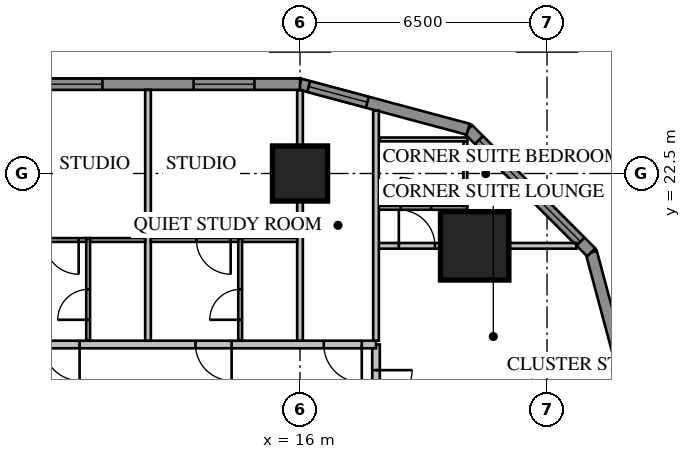
"""IFC4 building model, lengths in metres.
Left out: names, types, materials, properties, quantities, classifications, styles, units other than length and angle.
Written with IfcOpenShell. Run it as: python <this file> out.ifc"""

import sys

from ifc_helpers import new_model, si_unit, direction, frame, frame_2d, origin, origin_2d, place, context, subcontext, project, spatial, rectangle, extrude, element, fill, save


model = new_model("IFC4")
c1 = context("Model", 3, precision=1e-05, world=origin(), true_north=direction((0.0, 1.0)))
c2 = subcontext(c1, "Body", "Model", "MODEL_VIEW")
j1 = project(units=[si_unit("LENGTHUNIT", "METRE"), si_unit("PLANEANGLEUNIT", "RADIAN")], contexts=[c1])
p1 = place(None, origin())
s1 = spatial("IfcSite", under=j1, at=p1, CompositionType="ELEMENT")
p2 = place(p1, origin())
s2 = spatial("IfcBuilding", under=s1, at=p2, CompositionType="ELEMENT")
p3 = place(p2, frame((0.0, 0.0, 27.55)))
s3 = spatial("IfcBuildingStorey", under=s2, at=p3, CompositionType="ELEMENT", Elevation=27.55)
p4 = place(p3, frame((20.596, 20.596, 0.0), z_axis=(0.0, 0.0, 1.0), x_axis=(1.0, 0.0, 0.0)))
e1 = element("IfcColumn", 1, at=p4, inside=s3, PredefinedType="COLUMN", context=c2, shape_type="SweptSolid", body=[
    extrude(rectangle(XDim=1.8, YDim=1.8, at=origin_2d()), origin(), (0.0, 0.0, 1.0), 3.85),
])
p5 = place(p3, frame((16.0, 22.5, 0.0), z_axis=(0.0, 0.0, 1.0), x_axis=(1.0, 0.0, 0.0)))
e2 = element("IfcColumn", 2, at=p5, inside=s3, PredefinedType="COLUMN", context=c2, shape_type="SweptSolid", body=[
    extrude(rectangle(XDim=1.45, YDim=1.45, at=origin_2d()), origin(), (0.0, 0.0, 1.0), 3.85),
])
p6 = place(p3, frame((24.85, 16.0, 0.0), z_axis=(0.0, 0.0, 1.0), x_axis=(-0.258839972501, 0.965920218567, 0.0)))
e3 = element("IfcWall", 3, at=p6, inside=s3, PredefinedType="SOLIDWALL", context=c2, shape_type="SweptSolid", body=[
    extrude(rectangle(XDim=4.581, YDim=0.3, at=frame_2d((2.291, 0.0))), origin(), (0.0, 0.0, 1.0), 3.65),
])
p7 = place(p3, frame((23.664, 20.425, 0.0), z_axis=(0.0, 0.0, 1.0), x_axis=(-0.707106781187, 0.707106781187, 0.0)))
e4 = element("IfcWall", 4, at=p7, inside=s3, PredefinedType="SOLIDWALL", context=c2, shape_type="SweptSolid", body=[
    extrude(rectangle(XDim=4.581, YDim=0.3, at=frame_2d((2.291, 0.0))), origin(), (0.0, 0.0, 1.0), 3.65),
])
p8 = place(p7, frame((0.4, 0.0, 0.75)))
e5 = element("IfcOpeningElement", 5, at=p8, cuts=e4, PredefinedType="OPENING", context=c2, shape_type="SweptSolid", body=[
    extrude(rectangle(XDim=3.781, YDim=1.8, at=frame_2d((1.891, 0.9))), frame((0.0, 0.17, 0.0), z_axis=(0.0, -1.0, 0.0), x_axis=(1.0, 0.0, 0.0)), (0.0, 0.0, 1.0), 0.34),
])
p9 = place(p3, frame((20.425, 23.664, 0.0), z_axis=(0.0, 0.0, 1.0), x_axis=(-0.965920218567, 0.258839972501, 0.0)))
e6 = element("IfcWall", 6, at=p9, inside=s3, PredefinedType="SOLIDWALL", context=c2, shape_type="SweptSolid", body=[
    extrude(rectangle(XDim=4.581, YDim=0.3, at=frame_2d((2.291, 0.0))), origin(), (0.0, 0.0, 1.0), 3.65),
])
p10 = place(p9, frame((2.746, 0.0, 0.75)))
e7 = element("IfcOpeningElement", 7, at=p10, cuts=e6, PredefinedType="OPENING", context=c2, shape_type="SweptSolid", body=[
    extrude(rectangle(XDim=1.6, YDim=1.8, at=frame_2d((0.8, 0.9))), frame((0.0, 0.17, 0.0), z_axis=(0.0, -1.0, 0.0), x_axis=(1.0, 0.0, 0.0)), (0.0, 0.0, 1.0), 0.34),
])
p11 = place(p3, frame((16.0, 24.85, 0.0), z_axis=(0.0, 0.0, 1.0), x_axis=(-1.0, 0.0, 0.0)))
e8 = element("IfcWall", 8, at=p11, inside=s3, PredefinedType="SOLIDWALL", context=c2, shape_type="SweptSolid", body=[
    extrude(rectangle(XDim=32.0, YDim=0.3, at=frame_2d((16.0, 0.0))), origin(), (0.0, 0.0, 1.0), 3.65),
])
p12 = place(p11, frame((1.2, 0.0, 0.75)))
e9 = element("IfcOpeningElement", 9, at=p12, cuts=e8, PredefinedType="OPENING", context=c2, shape_type="SweptSolid", body=[
    extrude(rectangle(XDim=1.6, YDim=1.8, at=frame_2d((0.8, 0.9))), frame((0.0, 0.17, 0.0), z_axis=(0.0, -1.0, 0.0), x_axis=(1.0, 0.0, 0.0)), (0.0, 0.0, 1.0), 0.34),
])
p13 = place(p11, frame((5.2, 0.0, 0.75)))
e10 = element("IfcOpeningElement", 10, at=p13, cuts=e8, PredefinedType="OPENING", context=c2, shape_type="SweptSolid", body=[
    extrude(rectangle(XDim=1.6, YDim=1.8, at=frame_2d((0.8, 0.9))), frame((0.0, 0.17, 0.0), z_axis=(0.0, -1.0, 0.0), x_axis=(1.0, 0.0, 0.0)), (0.0, 0.0, 1.0), 0.34),
])
p14 = place(p11, frame((17.2, 0.0, 0.75)))
e11 = element("IfcOpeningElement", 11, at=p14, cuts=e8, PredefinedType="OPENING", context=c2, shape_type="SweptSolid", body=[
    extrude(rectangle(XDim=1.6, YDim=1.8, at=frame_2d((0.8, 0.9))), frame((0.0, 0.17, 0.0), z_axis=(0.0, -1.0, 0.0), x_axis=(1.0, 0.0, 0.0)), (0.0, 0.0, 1.0), 0.34),
])
p15 = place(p11, frame((21.2, 0.0, 0.75)))
e12 = element("IfcOpeningElement", 12, at=p15, cuts=e8, PredefinedType="OPENING", context=c2, shape_type="SweptSolid", body=[
    extrude(rectangle(XDim=1.6, YDim=1.8, at=frame_2d((0.8, 0.9))), frame((0.0, 0.17, 0.0), z_axis=(0.0, -1.0, 0.0), x_axis=(1.0, 0.0, 0.0)), (0.0, 0.0, 1.0), 0.34),
])
p16 = place(p11, frame((25.2, 0.0, 0.75)))
e13 = element("IfcOpeningElement", 13, at=p16, cuts=e8, PredefinedType="OPENING", context=c2, shape_type="SweptSolid", body=[
    extrude(rectangle(XDim=1.6, YDim=1.8, at=frame_2d((0.8, 0.9))), frame((0.0, 0.17, 0.0), z_axis=(0.0, -1.0, 0.0), x_axis=(1.0, 0.0, 0.0)), (0.0, 0.0, 1.0), 0.34),
])
p17 = place(p11, frame((29.2, 0.0, 0.75)))
e14 = element("IfcOpeningElement", 14, at=p17, cuts=e8, PredefinedType="OPENING", context=c2, shape_type="SweptSolid", body=[
    extrude(rectangle(XDim=1.6, YDim=1.8, at=frame_2d((0.8, 0.9))), frame((0.0, 0.17, 0.0), z_axis=(0.0, -1.0, 0.0), x_axis=(1.0, 0.0, 0.0)), (0.0, 0.0, 1.0), 0.34),
])
p18 = place(p11, frame((8.8, 0.0, 0.75)))
e15 = element("IfcOpeningElement", 15, at=p18, cuts=e8, PredefinedType="OPENING", context=c2, shape_type="SweptSolid", body=[
    extrude(rectangle(XDim=2.4, YDim=1.8, at=frame_2d((1.2, 0.9))), frame((0.0, 0.17, 0.0), z_axis=(0.0, -1.0, 0.0), x_axis=(1.0, 0.0, 0.0)), (0.0, 0.0, 1.0), 0.34),
])
p19 = place(p11, frame((13.812, 0.0, 0.0)))
e16 = element("IfcOpeningElement", 16, at=p19, cuts=e8, PredefinedType="OPENING", context=c2, shape_type="SweptSolid", body=[
    extrude(rectangle(XDim=1.0, YDim=2.4, at=frame_2d((0.5, 1.2))), frame((0.0, 0.17, 0.0), z_axis=(0.0, -1.0, 0.0), x_axis=(1.0, 0.0, 0.0)), (0.0, 0.0, 1.0), 0.34),
])
p20 = place(p3, frame((18.0, -18.0, 0.0), z_axis=(0.0, 0.0, 1.0), x_axis=(0.0, 1.0, 0.0)))
e17 = element("IfcWall", 17, at=p20, inside=s3, PredefinedType="PARTITIONING", context=c2, shape_type="SweptSolid", body=[
    extrude(rectangle(XDim=36.0, YDim=0.2, at=frame_2d((18.0, 0.0))), origin(), (0.0, 0.0, 1.0), 3.65),
])
p21 = place(p20, frame((10.4, 0.0, 0.0)))
e18 = element("IfcOpeningElement", 18, at=p21, cuts=e17, PredefinedType="OPENING", context=c2, shape_type="SweptSolid", body=[
    extrude(rectangle(XDim=1.0, YDim=2.1, at=frame_2d((0.5, 1.05))), frame((0.0, 0.12, 0.0), z_axis=(0.0, -1.0, 0.0), x_axis=(1.0, 0.0, 0.0)), (0.0, 0.0, 1.0), 0.24),
])
p22 = place(p20, frame((0.375, 0.0, 0.0)))
e19 = element("IfcOpeningElement", 19, at=p22, cuts=e17, PredefinedType="OPENING", context=c2, shape_type="SweptSolid", body=[
    extrude(rectangle(XDim=1.0, YDim=2.1, at=frame_2d((0.5, 1.05))), frame((0.0, 0.12, 0.0), z_axis=(0.0, -1.0, 0.0), x_axis=(1.0, 0.0, 0.0)), (0.0, 0.0, 1.0), 0.24),
])
p23 = place(p20, frame((34.375, 0.0, 0.0)))
e20 = element("IfcOpeningElement", 20, at=p23, cuts=e17, PredefinedType="OPENING", context=c2, shape_type="SweptSolid", body=[
    extrude(rectangle(XDim=0.95, YDim=2.1, at=frame_2d((0.475, 1.05))), frame((0.0, 0.12, 0.0), z_axis=(0.0, -1.0, 0.0), x_axis=(1.0, 0.0, 0.0)), (0.0, 0.0, 1.0), 0.24),
])
p24 = place(p3, frame((18.065, 21.596, 0.0), z_axis=(0.0, 0.0, 1.0), x_axis=(1.0, 0.0, 0.0)))
e21 = element("IfcWall", 21, at=p24, inside=s3, PredefinedType="PARTITIONING", context=c2, shape_type="SweptSolid", body=[
    extrude(rectangle(XDim=2.335, YDim=0.1, at=frame_2d((1.167, 0.0))), origin(), (0.0, 0.0, 1.0), 3.65),
])
p25 = place(p24, frame((0.585, 0.0, 0.0)))
e22 = element("IfcOpeningElement", 22, at=p25, cuts=e21, PredefinedType="OPENING", context=c2, shape_type="SweptSolid", body=[
    extrude(rectangle(XDim=0.8, YDim=2.1, at=frame_2d((0.4, 1.05))), frame((0.0, 0.07, 0.0), z_axis=(0.0, -1.0, 0.0), x_axis=(1.0, 0.0, 0.0)), (0.0, 0.0, 1.0), 0.14),
])
p26 = place(p3, frame((20.35, 21.646, 0.0), z_axis=(0.0, 0.0, 1.0), x_axis=(0.0, 1.0, 0.0)))
e23 = element("IfcWall", 23, at=p26, inside=s3, PredefinedType="PARTITIONING", context=c2, shape_type="SweptSolid", body=[
    extrude(rectangle(XDim=1.7, YDim=0.1, at=frame_2d((0.85, 0.0))), origin(), (0.0, 0.0, 1.0), 3.65),
])
p27 = place(p3, frame((18.1, 23.396, 0.0), z_axis=(0.0, 0.0, 1.0), x_axis=(1.0, 0.0, 0.0)))
e24 = element("IfcWall", 24, at=p27, inside=s3, PredefinedType="PARTITIONING", context=c2, shape_type="SweptSolid", body=[
    extrude(rectangle(XDim=2.3, YDim=0.1, at=frame_2d((1.15, 0.0))), origin(), (0.0, 0.0, 1.0), 3.65),
])
p28 = place(p3, frame((18.065, 20.596, 0.0), z_axis=(0.0, 0.0, 1.0), x_axis=(1.0, 0.0, 0.0)))
e25 = element("IfcWall", 25, at=p28, inside=s3, PredefinedType="PARTITIONING", context=c2, shape_type="SweptSolid", body=[
    extrude(rectangle(XDim=5.209, YDim=0.15, at=frame_2d((2.604, 0.0))), origin(), (0.0, 0.0, 1.0), 3.65),
])
p29 = place(p28, frame((0.535, 0.0, 0.0)))
e26 = element("IfcOpeningElement", 26, at=p29, cuts=e25, PredefinedType="OPENING", context=c2, shape_type="SweptSolid", body=[
    extrude(rectangle(XDim=0.95, YDim=2.1, at=frame_2d((0.475, 1.05))), frame((0.0, 0.095, 0.0), z_axis=(0.0, -1.0, 0.0), x_axis=(1.0, 0.0, 0.0)), (0.0, 0.0, 1.0), 0.19),
])
p30 = place(p3, frame((18.0, 18.0, 0.0), z_axis=(0.0, 0.0, 1.0), x_axis=(-1.0, 0.0, 0.0)))
e27 = element("IfcWall", 27, at=p30, inside=s3, PredefinedType="PARTITIONING", context=c2, shape_type="SweptSolid", body=[
    extrude(rectangle(XDim=36.0, YDim=0.2, at=frame_2d((18.0, 0.0))), origin(), (0.0, 0.0, 1.0), 3.65),
])
p31 = place(p30, frame((0.375, 0.0, 0.0)))
e28 = element("IfcOpeningElement", 28, at=p31, cuts=e27, PredefinedType="OPENING", context=c2, shape_type="SweptSolid", body=[
    extrude(rectangle(XDim=1.0, YDim=2.1, at=frame_2d((0.5, 1.05))), frame((0.0, 0.12, 0.0), z_axis=(0.0, -1.0, 0.0), x_axis=(1.0, 0.0, 0.0)), (0.0, 0.0, 1.0), 0.24),
])
p32 = place(p30, frame((3.8, 0.0, 0.0)))
e29 = element("IfcOpeningElement", 29, at=p32, cuts=e27, PredefinedType="OPENING", context=c2, shape_type="SweptSolid", body=[
    extrude(rectangle(XDim=0.95, YDim=2.1, at=frame_2d((0.475, 1.05))), frame((0.0, 0.12, 0.0), z_axis=(0.0, -1.0, 0.0), x_axis=(1.0, 0.0, 0.0)), (0.0, 0.0, 1.0), 0.24),
])
p33 = place(p30, frame((7.8, 0.0, 0.0)))
e30 = element("IfcOpeningElement", 30, at=p33, cuts=e27, PredefinedType="OPENING", context=c2, shape_type="SweptSolid", body=[
    extrude(rectangle(XDim=0.95, YDim=2.1, at=frame_2d((0.475, 1.05))), frame((0.0, 0.12, 0.0), z_axis=(0.0, -1.0, 0.0), x_axis=(1.0, 0.0, 0.0)), (0.0, 0.0, 1.0), 0.24),
])
p34 = place(p30, frame((19.8, 0.0, 0.0)))
e31 = element("IfcOpeningElement", 31, at=p34, cuts=e27, PredefinedType="OPENING", context=c2, shape_type="SweptSolid", body=[
    extrude(rectangle(XDim=0.95, YDim=2.1, at=frame_2d((0.475, 1.05))), frame((0.0, 0.12, 0.0), z_axis=(0.0, -1.0, 0.0), x_axis=(1.0, 0.0, 0.0)), (0.0, 0.0, 1.0), 0.24),
])
p35 = place(p30, frame((23.8, 0.0, 0.0)))
e32 = element("IfcOpeningElement", 32, at=p35, cuts=e27, PredefinedType="OPENING", context=c2, shape_type="SweptSolid", body=[
    extrude(rectangle(XDim=0.95, YDim=2.1, at=frame_2d((0.475, 1.05))), frame((0.0, 0.12, 0.0), z_axis=(0.0, -1.0, 0.0), x_axis=(1.0, 0.0, 0.0)), (0.0, 0.0, 1.0), 0.24),
])
p36 = place(p30, frame((27.8, 0.0, 0.0)))
e33 = element("IfcOpeningElement", 33, at=p36, cuts=e27, PredefinedType="OPENING", context=c2, shape_type="SweptSolid", body=[
    extrude(rectangle(XDim=0.95, YDim=2.1, at=frame_2d((0.475, 1.05))), frame((0.0, 0.12, 0.0), z_axis=(0.0, -1.0, 0.0), x_axis=(1.0, 0.0, 0.0)), (0.0, 0.0, 1.0), 0.24),
])
p37 = place(p30, frame((31.8, 0.0, 0.0)))
e34 = element("IfcOpeningElement", 34, at=p37, cuts=e27, PredefinedType="OPENING", context=c2, shape_type="SweptSolid", body=[
    extrude(rectangle(XDim=0.95, YDim=2.1, at=frame_2d((0.475, 1.05))), frame((0.0, 0.12, 0.0), z_axis=(0.0, -1.0, 0.0), x_axis=(1.0, 0.0, 0.0)), (0.0, 0.0, 1.0), 0.24),
])
p38 = place(p30, frame((34.375, 0.0, 0.0)))
e35 = element("IfcOpeningElement", 35, at=p38, cuts=e27, PredefinedType="OPENING", context=c2, shape_type="SweptSolid", body=[
    extrude(rectangle(XDim=0.95, YDim=2.1, at=frame_2d((0.475, 1.05))), frame((0.0, 0.12, 0.0), z_axis=(0.0, -1.0, 0.0), x_axis=(1.0, 0.0, 0.0)), (0.0, 0.0, 1.0), 0.24),
])
p39 = place(p30, frame((11.2, 0.0, 0.0)))
e36 = element("IfcOpeningElement", 36, at=p39, cuts=e27, PredefinedType="OPENING", context=c2, shape_type="SweptSolid", body=[
    extrude(rectangle(XDim=1.0, YDim=2.1, at=frame_2d((0.5, 1.05))), frame((0.0, 0.12, 0.0), z_axis=(0.0, -1.0, 0.0), x_axis=(1.0, 0.0, 0.0)), (0.0, 0.0, 1.0), 0.24),
])
p40 = place(p3, frame((18.0, 18.1, 0.0), z_axis=(0.0, 0.0, 1.0), x_axis=(0.0, 1.0, 0.0)))
e37 = element("IfcWall", 37, at=p40, inside=s3, PredefinedType="PARTITIONING", context=c2, shape_type="SweptSolid", body=[
    extrude(rectangle(XDim=6.053, YDim=0.15, at=frame_2d((3.027, 0.0))), origin(), (0.0, 0.0, 1.0), 3.65),
])
p41 = place(p3, frame((16.0, 18.1, 0.0), z_axis=(0.0, 0.0, 1.0), x_axis=(0.0, 1.0, 0.0)))
e38 = element("IfcWall", 38, at=p41, inside=s3, PredefinedType="PARTITIONING", context=c2, shape_type="SweptSolid", body=[
    extrude(rectangle(XDim=6.589, YDim=0.15, at=frame_2d((3.295, 0.0))), origin(), (0.0, 0.0, 1.0), 3.65),
])
p42 = place(p3, frame((12.0, 18.1, 0.0), z_axis=(0.0, 0.0, 1.0), x_axis=(0.0, 1.0, 0.0)))
e39 = element("IfcWall", 39, at=p42, inside=s3, PredefinedType="PARTITIONING", context=c2, shape_type="SweptSolid", body=[
    extrude(rectangle(XDim=6.6, YDim=0.15, at=frame_2d((3.3, 0.0))), origin(), (0.0, 0.0, 1.0), 3.65),
])
p43 = place(p3, frame((14.425, 18.1, 0.0), z_axis=(0.0, 0.0, 1.0), x_axis=(0.0, 1.0, 0.0)))
e40 = element("IfcWall", 40, at=p43, inside=s3, PredefinedType="PARTITIONING", context=c2, shape_type="SweptSolid", body=[
    extrude(rectangle(XDim=2.7, YDim=0.1, at=frame_2d((1.35, 0.0))), origin(), (0.0, 0.0, 1.0), 3.65),
])
p44 = place(p43, frame((0.55, 0.0, 0.0)))
e41 = element("IfcOpeningElement", 41, at=p44, cuts=e40, PredefinedType="OPENING", context=c2, shape_type="SweptSolid", body=[
    extrude(rectangle(XDim=0.8, YDim=2.1, at=frame_2d((0.4, 1.05))), frame((0.0, 0.07, 0.0), z_axis=(0.0, -1.0, 0.0), x_axis=(1.0, 0.0, 0.0)), (0.0, 0.0, 1.0), 0.14),
])
p45 = place(p3, frame((15.925, 20.75, 0.0), z_axis=(0.0, 0.0, 1.0), x_axis=(-1.0, 0.0, 0.0)))
e42 = element("IfcWall", 42, at=p45, inside=s3, PredefinedType="PARTITIONING", context=c2, shape_type="SweptSolid", body=[
    extrude(rectangle(XDim=1.45, YDim=0.1, at=frame_2d((0.725, 0.0))), origin(), (0.0, 0.0, 1.0), 3.65),
])
p46 = place(p3, frame((10.425, 18.1, 0.0), z_axis=(0.0, 0.0, 1.0), x_axis=(0.0, 1.0, 0.0)))
e43 = element("IfcWall", 43, at=p46, inside=s3, PredefinedType="PARTITIONING", context=c2, shape_type="SweptSolid", body=[
    extrude(rectangle(XDim=2.7, YDim=0.1, at=frame_2d((1.35, 0.0))), origin(), (0.0, 0.0, 1.0), 3.65),
])
p47 = place(p46, frame((0.55, 0.0, 0.0)))
e44 = element("IfcOpeningElement", 44, at=p47, cuts=e43, PredefinedType="OPENING", context=c2, shape_type="SweptSolid", body=[
    extrude(rectangle(XDim=0.8, YDim=2.1, at=frame_2d((0.4, 1.05))), frame((0.0, 0.07, 0.0), z_axis=(0.0, -1.0, 0.0), x_axis=(1.0, 0.0, 0.0)), (0.0, 0.0, 1.0), 0.14),
])
p48 = place(p3, frame((11.925, 20.75, 0.0), z_axis=(0.0, 0.0, 1.0), x_axis=(-1.0, 0.0, 0.0)))
e45 = element("IfcWall", 45, at=p48, inside=s3, PredefinedType="PARTITIONING", context=c2, shape_type="SweptSolid", body=[
    extrude(rectangle(XDim=1.45, YDim=0.1, at=frame_2d((0.725, 0.0))), origin(), (0.0, 0.0, 1.0), 3.65),
])
p49 = place(p3, frame((14.375, 20.75, 0.0), z_axis=(0.0, 0.0, 1.0), x_axis=(-1.0, 0.0, 0.0)))
e46 = element("IfcWall", 46, at=p49, inside=s3, PredefinedType="PARTITIONING", context=c2, shape_type="SweptSolid", body=[
    extrude(rectangle(XDim=2.3, YDim=0.1, at=frame_2d((1.15, 0.0))), origin(), (0.0, 0.0, 1.0), 3.65),
])
p50 = place(p49, frame((0.2, 0.0, 0.0)))
e47 = element("IfcOpeningElement", 47, at=p50, cuts=e46, PredefinedType="OPENING", context=c2, shape_type="SweptSolid", body=[
    extrude(rectangle(XDim=0.9, YDim=2.1, at=frame_2d((0.45, 1.05))), frame((0.0, 0.07, 0.0), z_axis=(0.0, -1.0, 0.0), x_axis=(1.0, 0.0, 0.0)), (0.0, 0.0, 1.0), 0.14),
])
p51 = place(p3, frame((10.375, 20.75, 0.0), z_axis=(0.0, 0.0, 1.0), x_axis=(-1.0, 0.0, 0.0)))
e48 = element("IfcWall", 48, at=p51, inside=s3, PredefinedType="PARTITIONING", context=c2, shape_type="SweptSolid", body=[
    extrude(rectangle(XDim=2.3, YDim=0.1, at=frame_2d((1.15, 0.0))), origin(), (0.0, 0.0, 1.0), 3.65),
])
p52 = place(p51, frame((0.2, 0.0, 0.0)))
e49 = element("IfcOpeningElement", 49, at=p52, cuts=e48, PredefinedType="OPENING", context=c2, shape_type="SweptSolid", body=[
    extrude(rectangle(XDim=0.9, YDim=2.1, at=frame_2d((0.45, 1.05))), frame((0.0, 0.07, 0.0), z_axis=(0.0, -1.0, 0.0), x_axis=(1.0, 0.0, 0.0)), (0.0, 0.0, 1.0), 0.14),
])
p53 = place(p8, origin())
e50 = element("IfcWindow", 50, at=p53, inside=s3, PartitioningType="SINGLE_PANEL", PredefinedType="WINDOW", context=c2, shape_type="SweptSolid", body=[
    extrude(rectangle(XDim=3.781, YDim=1.8, at=frame_2d((1.891, 0.9))), frame((0.0, 0.03, 0.0), z_axis=(0.0, -1.0, 0.0), x_axis=(1.0, 0.0, 0.0)), (0.0, 0.0, 1.0), 0.06),
])
fill(e5, e50)
p54 = place(p10, origin())
e51 = element("IfcWindow", 51, at=p54, inside=s3, PartitioningType="SINGLE_PANEL", PredefinedType="WINDOW", context=c2, shape_type="SweptSolid", body=[
    extrude(rectangle(XDim=1.6, YDim=1.8, at=frame_2d((0.8, 0.9))), frame((0.0, 0.03, 0.0), z_axis=(0.0, -1.0, 0.0), x_axis=(1.0, 0.0, 0.0)), (0.0, 0.0, 1.0), 0.06),
])
fill(e7, e51)
p55 = place(p12, origin())
e52 = element("IfcWindow", 52, at=p55, inside=s3, PartitioningType="SINGLE_PANEL", PredefinedType="WINDOW", context=c2, shape_type="SweptSolid", body=[
    extrude(rectangle(XDim=1.6, YDim=1.8, at=frame_2d((0.8, 0.9))), frame((0.0, 0.03, 0.0), z_axis=(0.0, -1.0, 0.0), x_axis=(1.0, 0.0, 0.0)), (0.0, 0.0, 1.0), 0.06),
])
fill(e9, e52)
p56 = place(p13, origin())
e53 = element("IfcWindow", 53, at=p56, inside=s3, PartitioningType="SINGLE_PANEL", PredefinedType="WINDOW", context=c2, shape_type="SweptSolid", body=[
    extrude(rectangle(XDim=1.6, YDim=1.8, at=frame_2d((0.8, 0.9))), frame((0.0, 0.03, 0.0), z_axis=(0.0, -1.0, 0.0), x_axis=(1.0, 0.0, 0.0)), (0.0, 0.0, 1.0), 0.06),
])
fill(e10, e53)
p57 = place(p23, origin())
e54 = element("IfcDoor", 54, at=p57, inside=s3, OperationType="SINGLE_SWING_RIGHT", PredefinedType="DOOR", context=c2, shape_type="SweptSolid", body=[
    extrude(rectangle(XDim=0.95, YDim=2.1, at=frame_2d((0.475, 1.05))), frame((0.0, 0.025, 0.0), z_axis=(0.0, -1.0, 0.0), x_axis=(1.0, 0.0, 0.0)), (0.0, 0.0, 1.0), 0.05),
])
fill(e20, e54)
p58 = place(p25, origin())
e55 = element("IfcDoor", 55, at=p58, inside=s3, OperationType="SINGLE_SWING_LEFT", PredefinedType="DOOR", context=c2, shape_type="SweptSolid", body=[
    extrude(rectangle(XDim=0.8, YDim=2.1, at=frame_2d((0.4, 1.05))), frame((0.0, 0.025, 0.0), z_axis=(0.0, -1.0, 0.0), x_axis=(1.0, 0.0, 0.0)), (0.0, 0.0, 1.0), 0.05),
])
fill(e22, e55)
p59 = place(p29, origin())
e56 = element("IfcDoor", 56, at=p59, inside=s3, OperationType="SINGLE_SWING_LEFT", PredefinedType="DOOR", context=c2, shape_type="SweptSolid", body=[
    extrude(rectangle(XDim=0.95, YDim=2.1, at=frame_2d((0.475, 1.05))), frame((0.0, 0.025, 0.0), z_axis=(0.0, -1.0, 0.0), x_axis=(1.0, 0.0, 0.0)), (0.0, 0.0, 1.0), 0.05),
])
fill(e26, e56)
p60 = place(p31, origin())
e57 = element("IfcDoor", 57, at=p60, inside=s3, OperationType="SINGLE_SWING_LEFT", PredefinedType="DOOR", context=c2, shape_type="SweptSolid", body=[
    extrude(rectangle(XDim=1.0, YDim=2.1, at=frame_2d((0.5, 1.05))), frame((0.0, 0.025, 0.0), z_axis=(0.0, -1.0, 0.0), x_axis=(1.0, 0.0, 0.0)), (0.0, 0.0, 1.0), 0.05),
])
fill(e28, e57)
p61 = place(p32, origin())
e58 = element("IfcDoor", 58, at=p61, inside=s3, OperationType="SINGLE_SWING_LEFT", PredefinedType="DOOR", context=c2, shape_type="SweptSolid", body=[
    extrude(rectangle(XDim=0.95, YDim=2.1, at=frame_2d((0.475, 1.05))), frame((0.0, 0.025, 0.0), z_axis=(0.0, -1.0, 0.0), x_axis=(1.0, 0.0, 0.0)), (0.0, 0.0, 1.0), 0.05),
])
fill(e29, e58)
p62 = place(p44, origin())
e59 = element("IfcDoor", 59, at=p62, inside=s3, OperationType="SINGLE_SWING_LEFT", PredefinedType="DOOR", context=c2, shape_type="SweptSolid", body=[
    extrude(rectangle(XDim=0.8, YDim=2.1, at=frame_2d((0.4, 1.05))), frame((0.0, 0.025, 0.0), z_axis=(0.0, -1.0, 0.0), x_axis=(1.0, 0.0, 0.0)), (0.0, 0.0, 1.0), 0.05),
])
fill(e41, e59)
p63 = place(p33, origin())
e60 = element("IfcDoor", 60, at=p63, inside=s3, OperationType="SINGLE_SWING_LEFT", PredefinedType="DOOR", context=c2, shape_type="SweptSolid", body=[
    extrude(rectangle(XDim=0.95, YDim=2.1, at=frame_2d((0.475, 1.05))), frame((0.0, 0.025, 0.0), z_axis=(0.0, -1.0, 0.0), x_axis=(1.0, 0.0, 0.0)), (0.0, 0.0, 1.0), 0.05),
])
fill(e30, e60)
p64 = place(p47, origin())
e61 = element("IfcDoor", 61, at=p64, inside=s3, OperationType="SINGLE_SWING_LEFT", PredefinedType="DOOR", context=c2, shape_type="SweptSolid", body=[
    extrude(rectangle(XDim=0.8, YDim=2.1, at=frame_2d((0.4, 1.05))), frame((0.0, 0.025, 0.0), z_axis=(0.0, -1.0, 0.0), x_axis=(1.0, 0.0, 0.0)), (0.0, 0.0, 1.0), 0.05),
])
fill(e44, e61)
p65 = place(p50, origin())
e62 = element("IfcDoor", 62, at=p65, inside=s3, OperationType="SINGLE_SWING_LEFT", PredefinedType="DOOR", context=c2, shape_type="SweptSolid", body=[
    extrude(rectangle(XDim=0.9, YDim=2.1, at=frame_2d((0.45, 1.05))), frame((0.0, 0.025, 0.0), z_axis=(0.0, -1.0, 0.0), x_axis=(1.0, 0.0, 0.0)), (0.0, 0.0, 1.0), 0.05),
])
fill(e47, e62)
p66 = place(p52, origin())
e63 = element("IfcDoor", 63, at=p66, inside=s3, OperationType="SINGLE_SWING_LEFT", PredefinedType="DOOR", context=c2, shape_type="SweptSolid", body=[
    extrude(rectangle(XDim=0.9, YDim=2.1, at=frame_2d((0.45, 1.05))), frame((0.0, 0.025, 0.0), z_axis=(0.0, -1.0, 0.0), x_axis=(1.0, 0.0, 0.0)), (0.0, 0.0, 1.0), 0.05),
])
fill(e49, e63)
save(model, sys.argv[1])
